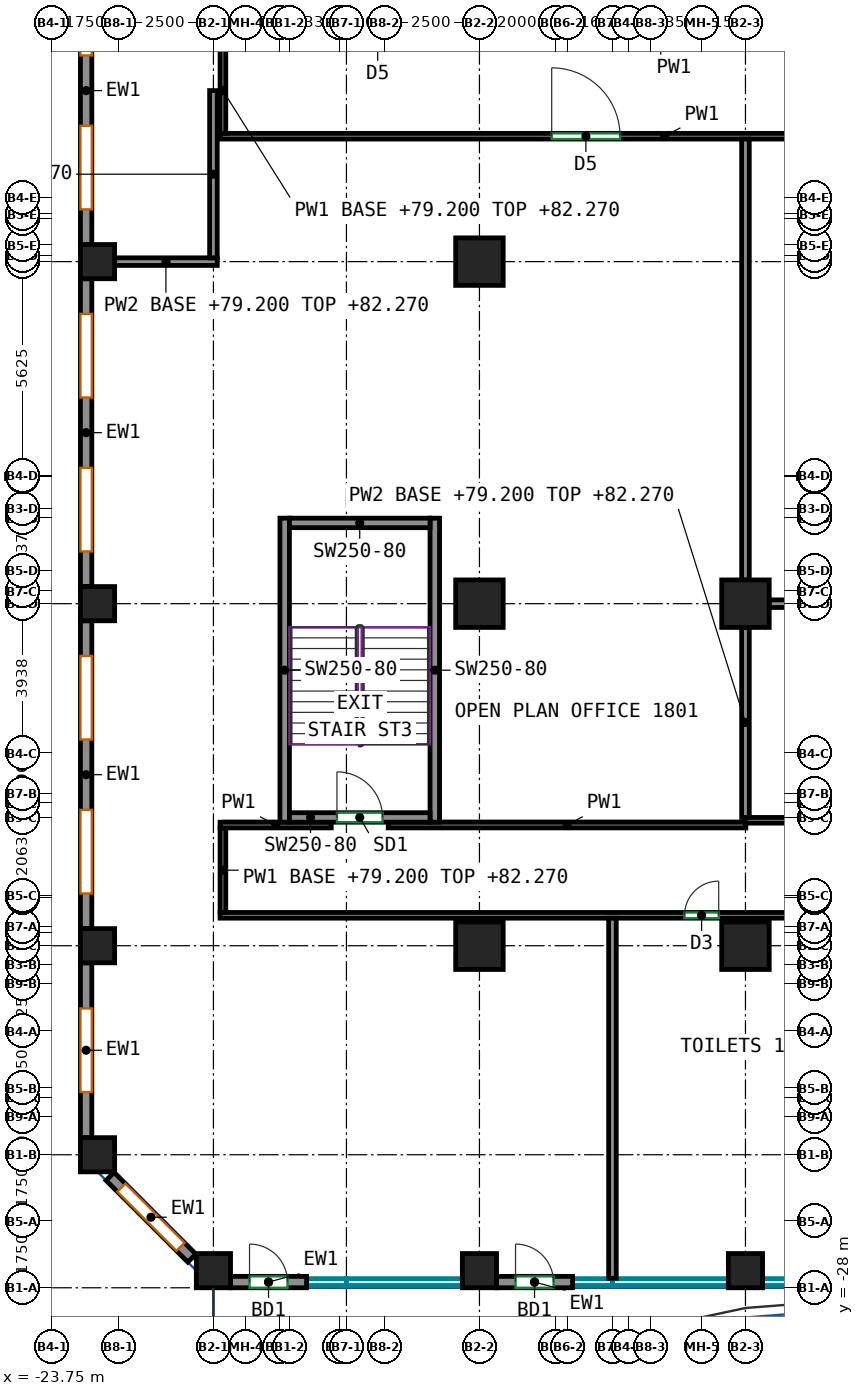
"""IFC4 building model, lengths in metres.
Left out: names, types, materials, properties, quantities, classifications, styles, units other than length and angle.
Written with IfcOpenShell. Run it as: python <this file> out.ifc"""

import sys

from ifc_helpers import new_model, si_unit, direction, frame, frame_2d, origin, origin_2d, place, context, subcontext, project, spatial, rectangle, extrude, source, transform, mapped, element, fill, save


model = new_model("IFC4")
c1 = context("Model", 3, precision=1e-05, world=origin(), true_north=direction((0.0, 1.0)))
c2 = subcontext(c1, "Body", "Model", "MODEL_VIEW")
j1 = project(units=[si_unit("LENGTHUNIT", "METRE"), si_unit("PLANEANGLEUNIT", "RADIAN")], contexts=[c1])
p1 = place(None, origin())
s1 = spatial("IfcSite", under=j1, at=p1, CompositionType="ELEMENT")
p2 = place(p1, origin())
s2 = spatial("IfcBuilding", under=s1, at=p2, CompositionType="ELEMENT")
p3 = place(p2, frame((0.0, 0.0, 79.2)))
s3 = spatial("IfcBuildingStorey", under=s2, at=p3, CompositionType="ELEMENT", Elevation=79.2)
m1 = source(origin(), c2, "Body", "SweptSolid", [
    extrude(rectangle(XDim=0.9, YDim=0.9, at=origin_2d()), origin(), (0.0, 0.0, 1.0), 3.72),
])
for number, where, z_axis, x_axis in (
    (1, (-22.55, -24.5, 0.0), (0.0, 0.0, 1.0), (1.0, 0.0, 0.0)),
    (2, (-22.55, -19.0, 0.0), (0.0, 0.0, 1.0), (1.0, 0.0, 0.0)),
    (3, (-22.55, -10.0, 0.0), (0.0, 0.0, 1.0), (1.0, 0.0, 0.0)),
    (4, (-22.55, -1.0, 0.0), (0.0, 0.0, 1.0), (1.0, 0.0, 0.0)),
    (5, (-19.5, -27.55, 0.0), (0.0, 0.0, 1.0), (1.0, 0.0, 0.0)),
    (6, (-12.5, -27.55, 0.0), (0.0, 0.0, 1.0), (1.0, 0.0, 0.0)),
):
    element("IfcColumn", number, at=place(p3, frame(where, z_axis=z_axis, x_axis=x_axis)), inside=s3, PredefinedType="COLUMN", context=c2, shape_type="MappedRepresentation", body=[
        mapped(m1, transform((0.0, 0.0, 0.0))),
    ])
m2 = source(origin(), c2, "Body", "SweptSolid", [
    extrude(rectangle(XDim=1.25, YDim=1.25, at=origin_2d()), origin(), (0.0, 0.0, 1.0), 3.72),
])
for number, where, z_axis, x_axis in (
    (7, (-12.5, -19.0, 0.0), (0.0, 0.0, 1.0), (1.0, 0.0, 0.0)),
    (8, (-12.5, -10.0, 0.0), (0.0, 0.0, 1.0), (1.0, 0.0, 0.0)),
    (9, (-12.5, -1.0, 0.0), (0.0, 0.0, 1.0), (1.0, 0.0, 0.0)),
):
    element("IfcColumn", number, at=place(p3, frame(where, z_axis=z_axis, x_axis=x_axis)), inside=s3, PredefinedType="COLUMN", context=c2, shape_type="MappedRepresentation", body=[
        mapped(m2, transform((0.0, 0.0, 0.0))),
    ])
p4 = place(p3, frame((-5.5, -27.55, 0.0), z_axis=(0.0, 0.0, 1.0), x_axis=(1.0, 0.0, 0.0)))
e10 = element("IfcColumn", 10, at=p4, inside=s3, PredefinedType="COLUMN", context=c2, shape_type="MappedRepresentation", body=[
    mapped(m1, transform((0.0, 0.0, 0.0))),
])
for number, where, z_axis, x_axis in (
    (11, (-5.5, -19.0, 0.0), (0.0, 0.0, 1.0), (1.0, 0.0, 0.0)),
    (12, (-5.5, -10.0, 0.0), (0.0, 0.0, 1.0), (1.0, 0.0, 0.0)),
):
    element("IfcColumn", number, at=place(p3, frame(where, z_axis=z_axis, x_axis=x_axis)), inside=s3, PredefinedType="COLUMN", context=c2, shape_type="MappedRepresentation", body=[
        mapped(m2, transform((0.0, 0.0, 0.0))),
    ])
m3 = source(origin(), c2, "Body", "SweptSolid", [
    extrude(rectangle(XDim=8.0, YDim=0.25, at=frame_2d((4.0, 0.0))), origin(), (0.0, 0.0, 1.0), 3.72),
])
for number, where, z_axis, x_axis in (
    (13, (-17.625, -15.75, 0.0), (0.0, 0.0, 1.0), (0.0, 1.0, 0.0)),
    (14, (-13.675, -15.75, 0.0), (0.0, 0.0, 1.0), (0.0, 1.0, 0.0)),
):
    element("IfcWall", number, at=place(p3, frame(where, z_axis=z_axis, x_axis=x_axis)), inside=s3, PredefinedType="SHEAR", context=c2, shape_type="MappedRepresentation", body=[
        mapped(m3, transform((0.0, 0.0, 0.0))),
    ])
m4 = source(origin(), c2, "Body", "SweptSolid", [
    extrude(rectangle(XDim=3.7, YDim=0.25, at=frame_2d((1.85, 0.0))), origin(), (0.0, 0.0, 1.0), 3.72),
])
p5 = place(p3, frame((-17.5, -15.625, 0.0), z_axis=(0.0, 0.0, 1.0), x_axis=(1.0, 0.0, 0.0)))
e15 = element("IfcWall", 15, at=p5, inside=s3, PredefinedType="SHEAR", context=c2, shape_type="MappedRepresentation", body=[
    mapped(m4, transform((0.0, 0.0, 0.0))),
])
p6 = place(p5, frame((1.25, 0.0, 0.0)))
e16 = element("IfcOpeningElement", 16, at=p6, cuts=e15, PredefinedType="OPENING", context=c2, shape_type="SweptSolid", body=[
    extrude(rectangle(XDim=1.2, YDim=2.1, at=frame_2d((0.6, 1.05))), frame((0.0, 0.135, 0.0), z_axis=(0.0, -1.0, 0.0), x_axis=(1.0, 0.0, 0.0)), (0.0, 0.0, 1.0), 0.27),
])
p7 = place(p3, frame((-17.5, -7.875, 0.0), z_axis=(0.0, 0.0, 1.0), x_axis=(1.0, 0.0, 0.0)))
e17 = element("IfcWall", 17, at=p7, inside=s3, PredefinedType="SHEAR", context=c2, shape_type="MappedRepresentation", body=[
    mapped(m4, transform((0.0, 0.0, 0.0))),
])
m5 = source(origin(), c2, "Body", "SweptSolid", [
    extrude(rectangle(XDim=2.0, YDim=0.3, at=frame_2d((1.0, 0.0))), origin(), (0.0, 0.0, 1.0), 3.72),
])
p8 = place(p3, frame((-19.05, -27.85, 0.0), z_axis=(0.0, 0.0, 1.0), x_axis=(1.0, 0.0, 0.0)))
e18 = element("IfcWall", 18, at=p8, inside=s3, PredefinedType="SOLIDWALL", context=c2, shape_type="MappedRepresentation", body=[
    mapped(m5, transform((0.0, 0.0, 0.0))),
])
p9 = place(p8, frame((0.5, 0.0, 0.0)))
e19 = element("IfcOpeningElement", 19, at=p9, cuts=e18, PredefinedType="OPENING", context=c2, shape_type="SweptSolid", body=[
    extrude(rectangle(XDim=1.0, YDim=2.1, at=frame_2d((0.5, 1.05))), frame((0.0, 0.16, 0.0), z_axis=(0.0, -1.0, 0.0), x_axis=(1.0, 0.0, 0.0)), (0.0, 0.0, 1.0), 0.32),
])
p10 = place(p3, frame((-12.05, -27.85, 0.0), z_axis=(0.0, 0.0, 1.0), x_axis=(1.0, 0.0, 0.0)))
e20 = element("IfcWall", 20, at=p10, inside=s3, PredefinedType="SOLIDWALL", context=c2, shape_type="MappedRepresentation", body=[
    mapped(m5, transform((0.0, 0.0, 0.0))),
])
p11 = place(p10, frame((0.5, 0.0, 0.0)))
e21 = element("IfcOpeningElement", 21, at=p11, cuts=e20, PredefinedType="OPENING", context=c2, shape_type="SweptSolid", body=[
    extrude(rectangle(XDim=1.0, YDim=2.1, at=frame_2d((0.5, 1.05))), frame((0.0, 0.16, 0.0), z_axis=(0.0, -1.0, 0.0), x_axis=(1.0, 0.0, 0.0)), (0.0, 0.0, 1.0), 0.32),
])
m6 = source(origin(), c2, "Body", "SweptSolid", [
    extrude(rectangle(XDim=8.1, YDim=0.3, at=frame_2d((4.05, 0.0))), origin(), (0.0, 0.0, 1.0), 3.72),
])
p12 = place(p3, frame((-22.85, 7.55, 0.0), z_axis=(0.0, 0.0, 1.0), x_axis=(0.0, -1.0, 0.0)))
e22 = element("IfcWall", 22, at=p12, inside=s3, PredefinedType="SOLIDWALL", context=c2, shape_type="MappedRepresentation", body=[
    mapped(m6, transform((0.0, 0.0, 0.0))),
])
p13 = place(p12, frame((0.925, 0.0, 0.7)))
e23 = element("IfcOpeningElement", 23, at=p13, cuts=e22, PredefinedType="OPENING", context=c2, shape_type="SweptSolid", body=[
    extrude(rectangle(XDim=2.2, YDim=2.25, at=frame_2d((1.1, 1.125))), frame((0.0, 0.16, 0.0), z_axis=(0.0, -1.0, 0.0), x_axis=(1.0, 0.0, 0.0)), (0.0, 0.0, 1.0), 0.32),
])
p14 = place(p12, frame((4.975, 0.0, 0.7)))
e24 = element("IfcOpeningElement", 24, at=p14, cuts=e22, PredefinedType="OPENING", context=c2, shape_type="SweptSolid", body=[
    extrude(rectangle(XDim=2.2, YDim=2.25, at=frame_2d((1.1, 1.125))), frame((0.0, 0.16, 0.0), z_axis=(0.0, -1.0, 0.0), x_axis=(1.0, 0.0, 0.0)), (0.0, 0.0, 1.0), 0.32),
])
p15 = place(p3, frame((-22.85, -1.45, 0.0), z_axis=(0.0, 0.0, 1.0), x_axis=(0.0, -1.0, 0.0)))
e25 = element("IfcWall", 25, at=p15, inside=s3, PredefinedType="SOLIDWALL", context=c2, shape_type="MappedRepresentation", body=[
    mapped(m6, transform((0.0, 0.0, 0.0))),
])
p16 = place(p15, frame((0.925, 0.0, 0.7)))
e26 = element("IfcOpeningElement", 26, at=p16, cuts=e25, PredefinedType="OPENING", context=c2, shape_type="SweptSolid", body=[
    extrude(rectangle(XDim=2.2, YDim=2.25, at=frame_2d((1.1, 1.125))), frame((0.0, 0.16, 0.0), z_axis=(0.0, -1.0, 0.0), x_axis=(1.0, 0.0, 0.0)), (0.0, 0.0, 1.0), 0.32),
])
p17 = place(p15, frame((4.975, 0.0, 0.7)))
e27 = element("IfcOpeningElement", 27, at=p17, cuts=e25, PredefinedType="OPENING", context=c2, shape_type="SweptSolid", body=[
    extrude(rectangle(XDim=2.2, YDim=2.25, at=frame_2d((1.1, 1.125))), frame((0.0, 0.16, 0.0), z_axis=(0.0, -1.0, 0.0), x_axis=(1.0, 0.0, 0.0)), (0.0, 0.0, 1.0), 0.32),
])
p18 = place(p3, frame((-22.85, -10.45, 0.0), z_axis=(0.0, 0.0, 1.0), x_axis=(0.0, -1.0, 0.0)))
e28 = element("IfcWall", 28, at=p18, inside=s3, PredefinedType="SOLIDWALL", context=c2, shape_type="MappedRepresentation", body=[
    mapped(m6, transform((0.0, 0.0, 0.0))),
])
p19 = place(p18, frame((0.925, 0.0, 0.7)))
e29 = element("IfcOpeningElement", 29, at=p19, cuts=e28, PredefinedType="OPENING", context=c2, shape_type="SweptSolid", body=[
    extrude(rectangle(XDim=2.2, YDim=2.25, at=frame_2d((1.1, 1.125))), frame((0.0, 0.16, 0.0), z_axis=(0.0, -1.0, 0.0), x_axis=(1.0, 0.0, 0.0)), (0.0, 0.0, 1.0), 0.32),
])
p20 = place(p18, frame((4.975, 0.0, 0.7)))
e30 = element("IfcOpeningElement", 30, at=p20, cuts=e28, PredefinedType="OPENING", context=c2, shape_type="SweptSolid", body=[
    extrude(rectangle(XDim=2.2, YDim=2.25, at=frame_2d((1.1, 1.125))), frame((0.0, 0.16, 0.0), z_axis=(0.0, -1.0, 0.0), x_axis=(1.0, 0.0, 0.0)), (0.0, 0.0, 1.0), 0.32),
])
m7 = source(origin(), c2, "Body", "SweptSolid", [
    extrude(rectangle(XDim=4.6, YDim=0.3, at=frame_2d((2.3, 0.0))), origin(), (0.0, 0.0, 1.0), 3.72),
])
p21 = place(p3, frame((-22.85, -19.45, 0.0), z_axis=(0.0, 0.0, 1.0), x_axis=(0.0, -1.0, 0.0)))
e31 = element("IfcWall", 31, at=p21, inside=s3, PredefinedType="SOLIDWALL", context=c2, shape_type="MappedRepresentation", body=[
    mapped(m7, transform((0.0, 0.0, 0.0))),
])
p22 = place(p21, frame((1.2, 0.0, 0.7)))
e32 = element("IfcOpeningElement", 32, at=p22, cuts=e31, PredefinedType="OPENING", context=c2, shape_type="SweptSolid", body=[
    extrude(rectangle(XDim=2.2, YDim=2.25, at=frame_2d((1.1, 1.125))), frame((0.0, 0.16, 0.0), z_axis=(0.0, -1.0, 0.0), x_axis=(1.0, 0.0, 0.0)), (0.0, 0.0, 1.0), 0.32),
])
m8 = source(origin(), c2, "Body", "SweptSolid", [
    extrude(rectangle(XDim=3.041, YDim=0.3, at=frame_2d((1.521, 0.0))), origin(), (0.0, 0.0, 1.0), 3.72),
])
p23 = place(p3, frame((-22.219, -25.069, 0.0), z_axis=(0.0, 0.0, 1.0), x_axis=(0.707106781187, -0.707106781187, 0.0)))
e33 = element("IfcWall", 33, at=p23, inside=s3, PredefinedType="SOLIDWALL", context=c2, shape_type="MappedRepresentation", body=[
    mapped(m8, transform((0.0, 0.0, 0.0))),
])
p24 = place(p23, frame((0.42, 0.0, 0.7)))
e34 = element("IfcOpeningElement", 34, at=p24, cuts=e33, PredefinedType="OPENING", context=c2, shape_type="SweptSolid", body=[
    extrude(rectangle(XDim=2.2, YDim=2.25, at=frame_2d((1.1, 1.125))), frame((0.0, 0.16, 0.0), z_axis=(0.0, -1.0, 0.0), x_axis=(1.0, 0.0, 0.0)), (0.0, 0.0, 1.0), 0.32),
])
p25 = place(p3, frame((-19.325, -18.2, 0.0), z_axis=(0.0, 0.0, 1.0), x_axis=(1.0, 0.0, 0.0)))
e35 = element("IfcWall", 35, at=p25, inside=s3, PredefinedType="PARTITIONING", context=c2, shape_type="SweptSolid", body=[
    extrude(rectangle(XDim=48.65, YDim=0.15, at=frame_2d((24.325, 0.0))), origin(), (0.0, 0.0, 1.0), 3.72),
])
p26 = place(p25, frame((12.221, 0.0, 0.0)))
e36 = element("IfcOpeningElement", 36, at=p26, cuts=e35, PredefinedType="OPENING", context=c2, shape_type="SweptSolid", body=[
    extrude(rectangle(XDim=0.9, YDim=2.1, at=frame_2d((0.45, 1.05))), frame((0.0, 0.085, 0.0), z_axis=(0.0, -1.0, 0.0), x_axis=(1.0, 0.0, 0.0)), (0.0, 0.0, 1.0), 0.17),
])
p27 = place(p25, frame((26.229, 0.0, 0.0)))
e37 = element("IfcOpeningElement", 37, at=p27, cuts=e35, PredefinedType="OPENING", context=c2, shape_type="SweptSolid", body=[
    extrude(rectangle(XDim=0.9, YDim=2.1, at=frame_2d((0.45, 1.05))), frame((0.0, 0.085, 0.0), z_axis=(0.0, -1.0, 0.0), x_axis=(1.0, 0.0, 0.0)), (0.0, 0.0, 1.0), 0.17),
])
p28 = place(p25, frame((38.029, 0.0, 0.0)))
e38 = element("IfcOpeningElement", 38, at=p28, cuts=e35, PredefinedType="OPENING", context=c2, shape_type="SweptSolid", body=[
    extrude(rectangle(XDim=0.9, YDim=2.1, at=frame_2d((0.45, 1.05))), frame((0.0, 0.085, 0.0), z_axis=(0.0, -1.0, 0.0), x_axis=(1.0, 0.0, 0.0)), (0.0, 0.0, 1.0), 0.17),
])
p29 = place(p3, frame((-19.25, -18.125, 0.0), z_axis=(0.0, 0.0, 1.0), x_axis=(0.0, 1.0, 0.0)))
e39 = element("IfcWall", 39, at=p29, inside=s3, PredefinedType="PARTITIONING", context=c2, shape_type="SweptSolid", body=[
    extrude(rectangle(XDim=2.225, YDim=0.15, at=frame_2d((1.113, 0.0))), origin(), (0.0, 0.0, 1.0), 3.07),
])
p30 = place(p3, frame((-14.9, -15.825, 0.0), z_axis=(0.0, 0.0, 1.0), x_axis=(1.0, 0.0, 0.0)))
e40 = element("IfcWall", 40, at=p30, inside=s3, PredefinedType="PARTITIONING", context=c2, shape_type="SweptSolid", body=[
    extrude(rectangle(XDim=9.41, YDim=0.15, at=frame_2d((4.705, 0.0))), origin(), (0.0, 0.0, 1.0), 3.72),
])
p31 = place(p3, frame((-19.325, -15.825, 0.0), z_axis=(0.0, 0.0, 1.0), x_axis=(1.0, 0.0, 0.0)))
e41 = element("IfcWall", 41, at=p31, inside=s3, PredefinedType="PARTITIONING", context=c2, shape_type="SweptSolid", body=[
    extrude(rectangle(XDim=2.925, YDim=0.15, at=frame_2d((1.462, 0.0))), origin(), (0.0, 0.0, 1.0), 3.72),
])
p32 = place(p3, frame((-19.325, 2.3, 0.0), z_axis=(0.0, 0.0, 1.0), x_axis=(1.0, 0.0, 0.0)))
e42 = element("IfcWall", 42, at=p32, inside=s3, PredefinedType="PARTITIONING", context=c2, shape_type="SweptSolid", body=[
    extrude(rectangle(XDim=23.4, YDim=0.15, at=frame_2d((11.7, 0.0))), origin(), (0.0, 0.0, 1.0), 3.72),
])
p33 = place(p32, frame((8.726, 0.0, 0.0)))
e43 = element("IfcOpeningElement", 43, at=p33, cuts=e42, PredefinedType="OPENING", context=c2, shape_type="SweptSolid", body=[
    extrude(rectangle(XDim=1.8, YDim=2.1, at=frame_2d((0.9, 1.05))), frame((0.0, 0.085, 0.0), z_axis=(0.0, -1.0, 0.0), x_axis=(1.0, 0.0, 0.0)), (0.0, 0.0, 1.0), 0.17),
])
p34 = place(p3, frame((-19.25, 2.375, 0.0), z_axis=(0.0, 0.0, 1.0), x_axis=(0.0, 1.0, 0.0)))
e44 = element("IfcWall", 44, at=p34, inside=s3, PredefinedType="PARTITIONING", context=c2, shape_type="SweptSolid", body=[
    extrude(rectangle(XDim=2.25, YDim=0.15, at=frame_2d((1.125, 0.0))), origin(), (0.0, 0.0, 1.0), 3.07),
])
p35 = place(p3, frame((-5.51, -15.7, 0.0), z_axis=(0.0, 0.0, 1.0), x_axis=(1.0, 0.0, 0.0)))
e45 = element("IfcWall", 45, at=p35, inside=s3, PredefinedType="PARTITIONING", context=c2, shape_type="SweptSolid", body=[
    extrude(rectangle(XDim=9.585, YDim=0.15, at=frame_2d((4.792, 0.0))), origin(), (0.0, 0.0, 1.0), 3.72),
])
p36 = place(p35, frame((1.21, 0.0, 0.0)))
e46 = element("IfcOpeningElement", 46, at=p36, cuts=e45, PredefinedType="OPENING", context=c2, shape_type="SweptSolid", body=[
    extrude(rectangle(XDim=0.9, YDim=2.1, at=frame_2d((0.45, 1.05))), frame((0.0, 0.085, 0.0), z_axis=(0.0, -1.0, 0.0), x_axis=(1.0, 0.0, 0.0)), (0.0, 0.0, 1.0), 0.17),
])
p37 = place(p3, frame((-19.4, -1.0, 0.0), z_axis=(0.0, 0.0, 1.0), x_axis=(-1.0, 0.0, 0.0)))
e47 = element("IfcWall", 47, at=p37, inside=s3, PredefinedType="PARTITIONING", context=c2, shape_type="SweptSolid", body=[
    extrude(rectangle(XDim=2.7, YDim=0.2, at=frame_2d((1.35, 0.0))), origin(), (0.0, 0.0, 1.0), 3.07),
])
p38 = place(p3, frame((-19.5, 3.5, 0.0), z_axis=(0.0, 0.0, 1.0), x_axis=(0.0, -1.0, 0.0)))
e48 = element("IfcWall", 48, at=p38, inside=s3, PredefinedType="PARTITIONING", context=c2, shape_type="SweptSolid", body=[
    extrude(rectangle(XDim=4.4, YDim=0.2, at=frame_2d((2.2, 0.0))), origin(), (0.0, 0.0, 1.0), 3.07),
])
p39 = place(p3, frame((-9.0, -27.75, 0.0), z_axis=(0.0, 0.0, 1.0), x_axis=(0.0, 1.0, 0.0)))
e49 = element("IfcWall", 49, at=p39, inside=s3, PredefinedType="PARTITIONING", context=c2, shape_type="SweptSolid", body=[
    extrude(rectangle(XDim=9.474, YDim=0.2, at=frame_2d((4.737, 0.0))), origin(), (0.0, 0.0, 1.0), 3.72),
])
p40 = place(p3, frame((-5.5, -15.624, 0.0), z_axis=(0.0, 0.0, 1.0), x_axis=(0.0, 1.0, 0.0)))
e50 = element("IfcWall", 50, at=p40, inside=s3, PredefinedType="PARTITIONING", context=c2, shape_type="SweptSolid", body=[
    extrude(rectangle(XDim=4.999, YDim=0.2, at=frame_2d((2.5, 0.0))), origin(), (0.0, 0.0, 1.0), 3.07),
])
p41 = place(p3, frame((-5.5, -9.375, 0.0), z_axis=(0.0, 0.0, 1.0), x_axis=(0.0, 1.0, 0.0)))
e51 = element("IfcWall", 51, at=p41, inside=s3, PredefinedType="PARTITIONING", context=c2, shape_type="SweptSolid", body=[
    extrude(rectangle(XDim=11.599, YDim=0.2, at=frame_2d((5.8, 0.0))), origin(), (0.0, 0.0, 1.0), 3.72),
])
p42 = place(p3, frame((-4.875, -10.0, 0.0), z_axis=(0.0, 0.0, 1.0), x_axis=(1.0, 0.0, 0.0)))
e52 = element("IfcWall", 52, at=p42, inside=s3, PredefinedType="PARTITIONING", context=c2, shape_type="SweptSolid", body=[
    extrude(rectangle(XDim=5.75, YDim=0.2, at=frame_2d((2.875, 0.0))), origin(), (0.0, 0.0, 1.0), 3.72),
])
p43 = place(p9, origin())
e53 = element("IfcDoor", 53, at=p43, inside=s3, OperationType="SINGLE_SWING_LEFT", PredefinedType="DOOR", context=c2, shape_type="SweptSolid", body=[
    extrude(rectangle(XDim=1.0, YDim=2.1, at=frame_2d((0.5, 1.05))), frame((0.0, 0.025, 0.0), z_axis=(0.0, -1.0, 0.0), x_axis=(1.0, 0.0, 0.0)), (0.0, 0.0, 1.0), 0.05),
])
fill(e19, e53)
p44 = place(p11, origin())
e54 = element("IfcDoor", 54, at=p44, inside=s3, OperationType="SINGLE_SWING_LEFT", PredefinedType="DOOR", context=c2, shape_type="SweptSolid", body=[
    extrude(rectangle(XDim=1.0, YDim=2.1, at=frame_2d((0.5, 1.05))), frame((0.0, 0.025, 0.0), z_axis=(0.0, -1.0, 0.0), x_axis=(1.0, 0.0, 0.0)), (0.0, 0.0, 1.0), 0.05),
])
fill(e21, e54)
p45 = place(p13, origin())
e55 = element("IfcWindow", 55, at=p45, inside=s3, PartitioningType="SINGLE_PANEL", PredefinedType="WINDOW", context=c2, shape_type="SweptSolid", body=[
    extrude(rectangle(XDim=2.2, YDim=2.25, at=frame_2d((1.1, 1.125))), frame((0.0, 0.03, 0.0), z_axis=(0.0, -1.0, 0.0), x_axis=(1.0, 0.0, 0.0)), (0.0, 0.0, 1.0), 0.06),
])
fill(e23, e55)
p46 = place(p14, origin())
e56 = element("IfcWindow", 56, at=p46, inside=s3, PartitioningType="SINGLE_PANEL", PredefinedType="WINDOW", context=c2, shape_type="SweptSolid", body=[
    extrude(rectangle(XDim=2.2, YDim=2.25, at=frame_2d((1.1, 1.125))), frame((0.0, 0.03, 0.0), z_axis=(0.0, -1.0, 0.0), x_axis=(1.0, 0.0, 0.0)), (0.0, 0.0, 1.0), 0.06),
])
fill(e24, e56)
p47 = place(p16, origin())
e57 = element("IfcWindow", 57, at=p47, inside=s3, PartitioningType="SINGLE_PANEL", PredefinedType="WINDOW", context=c2, shape_type="SweptSolid", body=[
    extrude(rectangle(XDim=2.2, YDim=2.25, at=frame_2d((1.1, 1.125))), frame((0.0, 0.03, 0.0), z_axis=(0.0, -1.0, 0.0), x_axis=(1.0, 0.0, 0.0)), (0.0, 0.0, 1.0), 0.06),
])
fill(e26, e57)
p48 = place(p17, origin())
e58 = element("IfcWindow", 58, at=p48, inside=s3, PartitioningType="SINGLE_PANEL", PredefinedType="WINDOW", context=c2, shape_type="SweptSolid", body=[
    extrude(rectangle(XDim=2.2, YDim=2.25, at=frame_2d((1.1, 1.125))), frame((0.0, 0.03, 0.0), z_axis=(0.0, -1.0, 0.0), x_axis=(1.0, 0.0, 0.0)), (0.0, 0.0, 1.0), 0.06),
])
fill(e27, e58)
p49 = place(p19, origin())
e59 = element("IfcWindow", 59, at=p49, inside=s3, PartitioningType="SINGLE_PANEL", PredefinedType="WINDOW", context=c2, shape_type="SweptSolid", body=[
    extrude(rectangle(XDim=2.2, YDim=2.25, at=frame_2d((1.1, 1.125))), frame((0.0, 0.03, 0.0), z_axis=(0.0, -1.0, 0.0), x_axis=(1.0, 0.0, 0.0)), (0.0, 0.0, 1.0), 0.06),
])
fill(e29, e59)
p50 = place(p20, origin())
e60 = element("IfcWindow", 60, at=p50, inside=s3, PartitioningType="SINGLE_PANEL", PredefinedType="WINDOW", context=c2, shape_type="SweptSolid", body=[
    extrude(rectangle(XDim=2.2, YDim=2.25, at=frame_2d((1.1, 1.125))), frame((0.0, 0.03, 0.0), z_axis=(0.0, -1.0, 0.0), x_axis=(1.0, 0.0, 0.0)), (0.0, 0.0, 1.0), 0.06),
])
fill(e30, e60)
p51 = place(p22, origin())
e61 = element("IfcWindow", 61, at=p51, inside=s3, PartitioningType="SINGLE_PANEL", PredefinedType="WINDOW", context=c2, shape_type="SweptSolid", body=[
    extrude(rectangle(XDim=2.2, YDim=2.25, at=frame_2d((1.1, 1.125))), frame((0.0, 0.03, 0.0), z_axis=(0.0, -1.0, 0.0), x_axis=(1.0, 0.0, 0.0)), (0.0, 0.0, 1.0), 0.06),
])
fill(e32, e61)
p52 = place(p24, origin())
e62 = element("IfcWindow", 62, at=p52, inside=s3, PartitioningType="SINGLE_PANEL", PredefinedType="WINDOW", context=c2, shape_type="SweptSolid", body=[
    extrude(rectangle(XDim=2.2, YDim=2.25, at=frame_2d((1.1, 1.125))), frame((0.0, 0.03, 0.0), z_axis=(0.0, -1.0, 0.0), x_axis=(1.0, 0.0, 0.0)), (0.0, 0.0, 1.0), 0.06),
])
fill(e34, e62)
p53 = place(p6, origin())
e63 = element("IfcDoor", 63, at=p53, inside=s3, OperationType="DOUBLE_DOOR_SINGLE_SWING", PredefinedType="DOOR", context=c2, shape_type="SweptSolid", body=[
    extrude(rectangle(XDim=1.2, YDim=2.1, at=frame_2d((0.6, 1.05))), frame((0.0, 0.025, 0.0), z_axis=(0.0, -1.0, 0.0), x_axis=(1.0, 0.0, 0.0)), (0.0, 0.0, 1.0), 0.05),
])
fill(e16, e63)
p54 = place(p26, origin())
e64 = element("IfcDoor", 64, at=p54, inside=s3, OperationType="SINGLE_SWING_RIGHT", PredefinedType="DOOR", context=c2, shape_type="SweptSolid", body=[
    extrude(rectangle(XDim=0.9, YDim=2.1, at=frame_2d((0.45, 1.05))), frame((0.0, 0.025, 0.0), z_axis=(0.0, -1.0, 0.0), x_axis=(1.0, 0.0, 0.0)), (0.0, 0.0, 1.0), 0.05),
])
fill(e36, e64)
p55 = place(p33, origin())
e65 = element("IfcDoor", 65, at=p55, inside=s3, OperationType="DOUBLE_DOOR_SINGLE_SWING", PredefinedType="DOOR", context=c2, shape_type="SweptSolid", body=[
    extrude(rectangle(XDim=1.8, YDim=2.1, at=frame_2d((0.9, 1.05))), frame((0.0, 0.025, 0.0), z_axis=(0.0, -1.0, 0.0), x_axis=(1.0, 0.0, 0.0)), (0.0, 0.0, 1.0), 0.05),
])
fill(e43, e65)
save(model, sys.argv[1])
